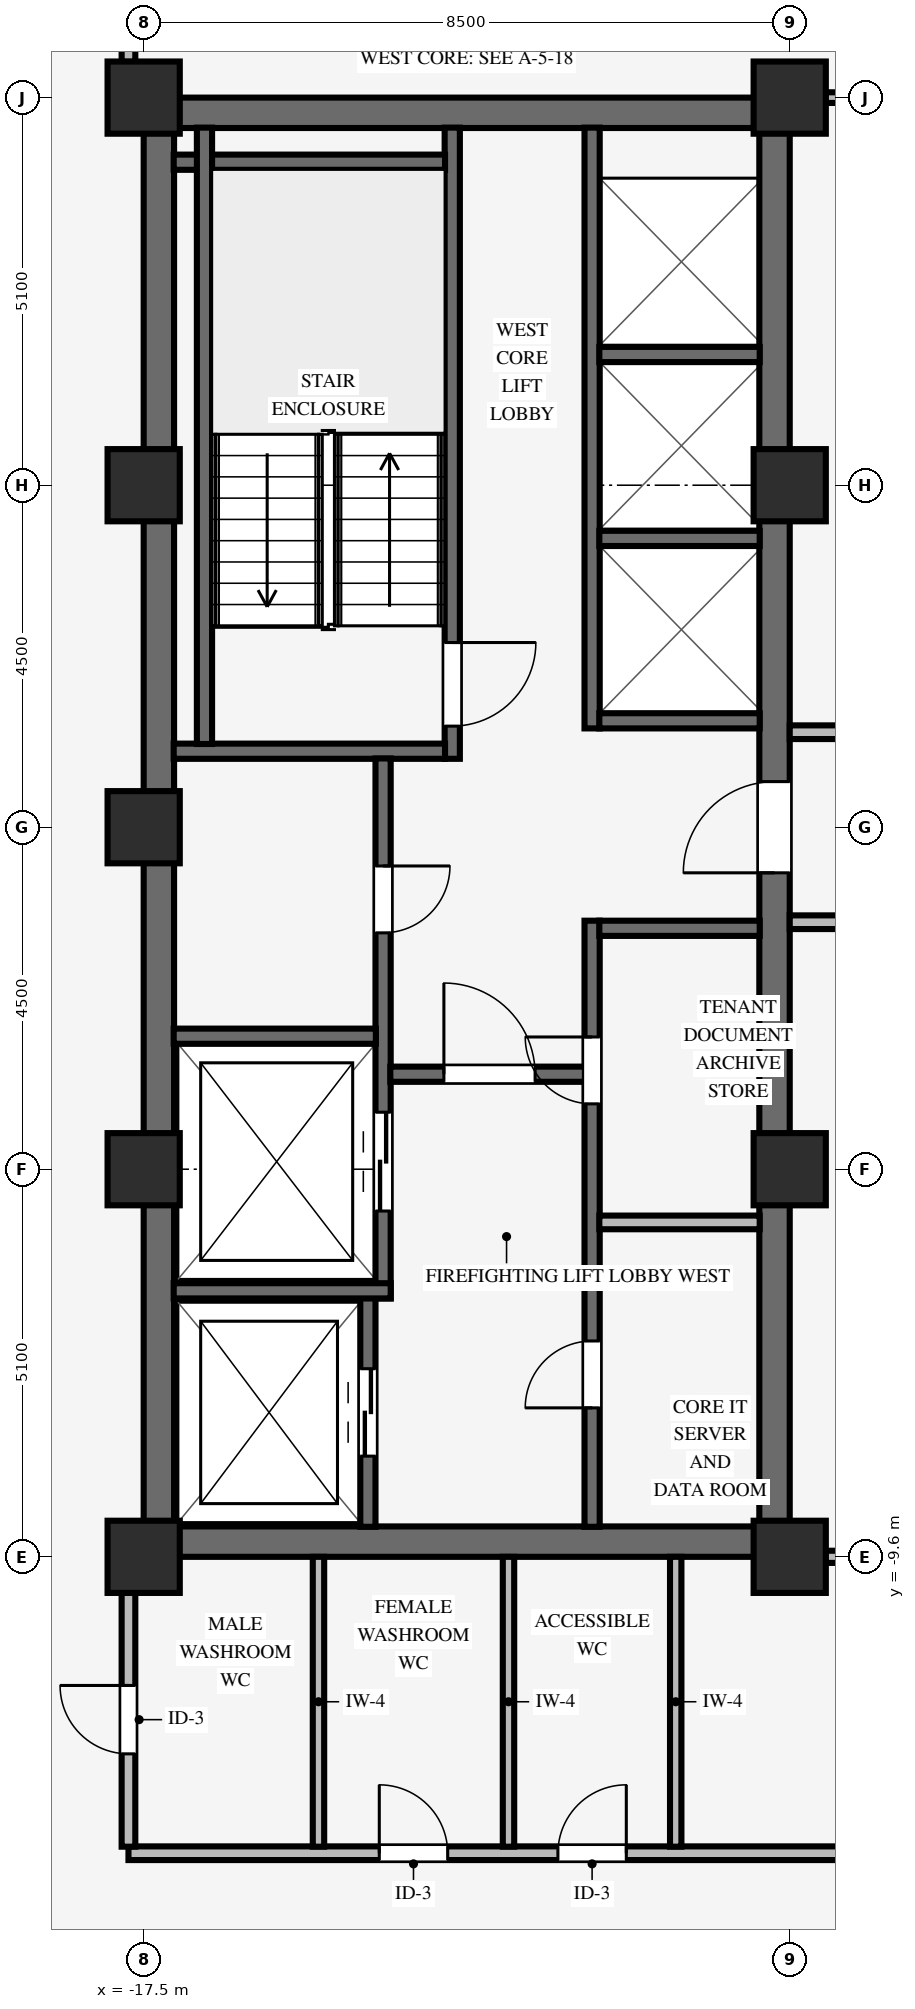
"""IFC4 building model, lengths in metres.
Left out: names, types, materials, properties, quantities, classifications, styles, units other than length and angle.
Written with IfcOpenShell. Run it as: python <this file> out.ifc"""

import sys

from ifc_helpers import new_model, si_unit, direction, frame, frame_2d, origin, origin_2d, place, context, subcontext, project, spatial, rectangle, extrude, source, transform, mapped, element, fill, save


model = new_model("IFC4")
c1 = context("Model", 3, precision=1e-05, world=origin(), true_north=direction((0.0, 1.0)))
c2 = subcontext(c1, "Body", "Model", "MODEL_VIEW")
j1 = project(units=[si_unit("LENGTHUNIT", "METRE"), si_unit("PLANEANGLEUNIT", "RADIAN")], contexts=[c1])
p1 = place(None, origin())
s1 = spatial("IfcSite", under=j1, at=p1, CompositionType="ELEMENT")
p2 = place(p1, origin())
s2 = spatial("IfcBuilding", under=s1, at=p2, CompositionType="ELEMENT")
p3 = place(p2, frame((0.0, 0.0, 134.8)))
s3 = spatial("IfcBuildingStorey", under=s2, at=p3, CompositionType="ELEMENT", Elevation=134.8)
for number, where, z_axis, x_axis in (
    (1, (-17.5, -9.4, 0.0), (0.0, 0.0, 1.0), (1.0, 0.0, 0.0)),
    (2, (-17.5, 9.4, 0.0), (0.0, 0.0, 1.0), (1.0, 0.0, 0.0)),
):
    element("IfcWall", number, at=place(p3, frame(where, z_axis=z_axis, x_axis=x_axis)), inside=s3, PredefinedType="SHEAR", context=c2, shape_type="SweptSolid", body=[
        extrude(rectangle(XDim=8.5, YDim=0.4, at=frame_2d((4.25, 0.0))), origin(), (0.0, 0.0, 1.0), 3.37),
    ])
p4 = place(p3, frame((-17.3, -9.205, 0.0), z_axis=(0.0, 0.0, 1.0), x_axis=(0.0, 1.0, 0.0)))
e3 = element("IfcWall", 3, at=p4, inside=s3, PredefinedType="SHEAR", context=c2, shape_type="SweptSolid", body=[
    extrude(rectangle(XDim=18.41, YDim=0.4, at=frame_2d((9.205, 0.0))), origin(), (0.0, 0.0, 1.0), 3.37),
])
p5 = place(p3, frame((-9.2, -9.205, 0.0), z_axis=(0.0, 0.0, 1.0), x_axis=(0.0, 1.0, 0.0)))
e4 = element("IfcWall", 4, at=p5, inside=s3, PredefinedType="SHEAR", context=c2, shape_type="SweptSolid", body=[
    extrude(rectangle(XDim=18.41, YDim=0.4, at=frame_2d((9.205, 0.0))), origin(), (0.0, 0.0, 1.0), 3.37),
])
p6 = place(p5, frame((8.605, 0.0, 0.0)))
e5 = element("IfcOpeningElement", 5, at=p6, cuts=e4, PredefinedType="OPENING", context=c2, shape_type="SweptSolid", body=[
    extrude(rectangle(XDim=1.2, YDim=2.15, at=frame_2d((0.6, 1.075))), frame((0.0, 0.21, 0.0), z_axis=(0.0, -1.0, 0.0), x_axis=(1.0, 0.0, 0.0)), (0.0, 0.0, 1.0), 0.42),
])
for number, where, z_axis, x_axis in (
    (6, (-17.5, -9.6, 0.0), (0.0, 0.0, 1.0), (1.0, 0.0, 0.0)),
    (7, (-17.5, -4.5, 0.0), (0.0, 0.0, 1.0), (1.0, 0.0, 0.0)),
    (8, (-17.5, 4.5, 0.0), (0.0, 0.0, 1.0), (1.0, 0.0, 0.0)),
    (9, (-17.5, 9.6, 0.0), (0.0, 0.0, 1.0), (1.0, 0.0, 0.0)),
    (10, (-9.0, -9.6, 0.0), (0.0, 0.0, 1.0), (1.0, 0.0, 0.0)),
    (11, (-9.0, -4.5, 0.0), (0.0, 0.0, 1.0), (1.0, 0.0, 0.0)),
    (12, (-9.0, 4.5, 0.0), (0.0, 0.0, 1.0), (1.0, 0.0, 0.0)),
    (13, (-9.0, 9.6, 0.0), (0.0, 0.0, 1.0), (1.0, 0.0, 0.0)),
    (14, (-17.5, 0.0, 0.0), (0.0, 0.0, 1.0), (1.0, 0.0, 0.0)),
):
    element("IfcColumn", number, at=place(p3, frame(where, z_axis=z_axis, x_axis=x_axis)), inside=s3, PredefinedType="COLUMN", context=c2, shape_type="SweptSolid", body=[
        extrude(rectangle(XDim=0.95, YDim=0.95, at=origin_2d()), origin(), (0.0, 0.0, 1.0), 3.37),
    ])
p7 = place(p3, frame((-13.44, 0.9, 0.0), z_axis=(0.0, 0.0, 1.0), x_axis=(0.0, 1.0, 0.0)))
e15 = element("IfcWall", 15, at=p7, inside=s3, PredefinedType="SHEAR", context=c2, shape_type="SweptSolid", body=[
    extrude(rectangle(XDim=8.305, YDim=0.2, at=frame_2d((4.153, 0.0))), origin(), (0.0, 0.0, 1.0), 3.37),
])
p8 = place(p7, frame((1.53, 0.0, 0.0), z_axis=(0.0, 0.0, 1.0), x_axis=(-1.0, 0.0, 0.0)))
e16 = element("IfcOpeningElement", 16, at=p8, cuts=e15, PredefinedType="OPENING", context=c2, shape_type="SweptSolid", body=[
    extrude(rectangle(XDim=1.1, YDim=2.15, at=frame_2d((0.55, 1.075))), frame((0.0, 0.11, 0.0), z_axis=(0.0, -1.0, 0.0), x_axis=(1.0, 0.0, 0.0)), (0.0, 0.0, 1.0), 0.22),
])
for number, where, z_axis, x_axis in (
    (17, (-17.105, 1.0, 0.0), (0.0, 0.0, 1.0), (1.0, 0.0, 0.0)),
    (18, (-17.105, 8.75, 0.0), (0.0, 0.0, 1.0), (1.0, 0.0, 0.0)),
):
    element("IfcWall", number, at=place(p3, frame(where, z_axis=z_axis, x_axis=x_axis)), inside=s3, PredefinedType="SHEAR", context=c2, shape_type="SweptSolid", body=[
        extrude(rectangle(XDim=3.57, YDim=0.2, at=frame_2d((1.785, 0.0))), origin(), (0.0, 0.0, 1.0), 3.37),
    ])
p9 = place(p3, frame((-16.7, 1.095, 0.0), z_axis=(0.0, 0.0, 1.0), x_axis=(0.0, 1.0, 0.0)))
e19 = element("IfcWall", 19, at=p9, inside=s3, PredefinedType="SHEAR", context=c2, shape_type="SweptSolid", body=[
    extrude(rectangle(XDim=8.11, YDim=0.2, at=frame_2d((4.055, 0.0))), origin(), (0.0, 0.0, 1.0), 3.37),
])
p10 = place(p3, frame((-14.55, -9.205, 0.0), z_axis=(0.0, 0.0, 1.0), x_axis=(0.0, 1.0, 0.0)))
e20 = element("IfcWall", 20, at=p10, inside=s3, PredefinedType="SHEAR", context=c2, shape_type="SweptSolid", body=[
    extrude(rectangle(XDim=3.01, YDim=0.2, at=frame_2d((1.505, 0.0))), origin(), (0.0, 0.0, 1.0), 3.37),
])
p11 = place(p10, frame((0.93, 0.0, 0.0)))
e21 = element("IfcOpeningElement", 21, at=p11, cuts=e20, PredefinedType="OPENING", context=c2, shape_type="SweptSolid", body=[
    extrude(rectangle(XDim=1.15, YDim=2.15, at=frame_2d((0.575, 1.075))), frame((0.0, 0.11, 0.0), z_axis=(0.0, -1.0, 0.0), x_axis=(1.0, 0.0, 0.0)), (0.0, 0.0, 1.0), 0.22),
])
p12 = place(p3, frame((-14.35, -6.2, 0.0), z_axis=(0.0, 0.0, 1.0), x_axis=(0.0, 1.0, 0.0)))
e22 = element("IfcWall", 22, at=p12, inside=s3, PredefinedType="SHEAR", context=c2, shape_type="SweptSolid", body=[
    extrude(rectangle(XDim=7.105, YDim=0.2, at=frame_2d((3.552, 0.0))), origin(), (0.0, 0.0, 1.0), 3.37),
])
p13 = place(p12, frame((5.69, 0.0, 0.0), z_axis=(0.0, 0.0, 1.0), x_axis=(-1.0, 0.0, 0.0)))
e23 = element("IfcOpeningElement", 23, at=p13, cuts=e22, PredefinedType="OPENING", context=c2, shape_type="SweptSolid", body=[
    extrude(rectangle(XDim=0.88, YDim=2.1, at=frame_2d((0.44, 1.05))), frame((0.0, 0.11, 0.0), z_axis=(0.0, -1.0, 0.0), x_axis=(1.0, 0.0, 0.0)), (0.0, 0.0, 1.0), 0.22),
])
p14 = place(p12, frame((1.15, 0.0, 0.0)))
e24 = element("IfcOpeningElement", 24, at=p14, cuts=e22, PredefinedType="OPENING", context=c2, shape_type="SweptSolid", body=[
    extrude(rectangle(XDim=1.3, YDim=2.2, at=frame_2d((0.65, 1.1))), frame((0.0, 0.11, 0.0), z_axis=(0.0, -1.0, 0.0), x_axis=(1.0, 0.0, 0.0)), (0.0, 0.0, 1.0), 0.22),
])
p15 = place(p3, frame((-17.105, -6.1, 0.0), z_axis=(0.0, 0.0, 1.0), x_axis=(1.0, 0.0, 0.0)))
e25 = element("IfcWall", 25, at=p15, inside=s3, PredefinedType="SHEAR", context=c2, shape_type="SweptSolid", body=[
    extrude(rectangle(XDim=2.855, YDim=0.2, at=frame_2d((1.427, 0.0))), origin(), (0.0, 0.0, 1.0), 3.37),
])
p16 = place(p3, frame((-17.105, -2.75, 0.0), z_axis=(0.0, 0.0, 1.0), x_axis=(1.0, 0.0, 0.0)))
e26 = element("IfcWall", 26, at=p16, inside=s3, PredefinedType="SHEAR", context=c2, shape_type="SweptSolid", body=[
    extrude(rectangle(XDim=2.66, YDim=0.2, at=frame_2d((1.33, 0.0))), origin(), (0.0, 0.0, 1.0), 3.37),
])
p17 = place(p3, frame((-11.6, -9.205, 0.0), z_axis=(0.0, 0.0, 1.0), x_axis=(0.0, 1.0, 0.0)))
e27 = element("IfcWall", 27, at=p17, inside=s3, PredefinedType="SHEAR", context=c2, shape_type="SweptSolid", body=[
    extrude(rectangle(XDim=7.975, YDim=0.2, at=frame_2d((3.988, 0.0))), origin(), (0.0, 0.0, 1.0), 3.37),
])
p18 = place(p17, frame((1.565, 0.0, 0.0)))
e28 = element("IfcOpeningElement", 28, at=p18, cuts=e27, PredefinedType="OPENING", context=c2, shape_type="SweptSolid", body=[
    extrude(rectangle(XDim=0.88, YDim=2.1, at=frame_2d((0.44, 1.05))), frame((0.0, 0.11, 0.0), z_axis=(0.0, -1.0, 0.0), x_axis=(1.0, 0.0, 0.0)), (0.0, 0.0, 1.0), 0.22),
])
p19 = place(p17, frame((5.565, 0.0, 0.0)))
e29 = element("IfcOpeningElement", 29, at=p19, cuts=e27, PredefinedType="OPENING", context=c2, shape_type="SweptSolid", body=[
    extrude(rectangle(XDim=0.88, YDim=2.1, at=frame_2d((0.44, 1.05))), frame((0.0, 0.11, 0.0), z_axis=(0.0, -1.0, 0.0), x_axis=(1.0, 0.0, 0.0)), (0.0, 0.0, 1.0), 0.22),
])
p20 = place(p3, frame((-14.255, -3.25, 0.0), z_axis=(0.0, 0.0, 1.0), x_axis=(1.0, 0.0, 0.0)))
e30 = element("IfcWall", 30, at=p20, inside=s3, PredefinedType="SHEAR", context=c2, shape_type="SweptSolid", body=[
    extrude(rectangle(XDim=2.56, YDim=0.2, at=frame_2d((1.28, 0.0))), origin(), (0.0, 0.0, 1.0), 3.37),
])
p21 = place(p20, frame((0.705, 0.0, 0.0)))
e31 = element("IfcOpeningElement", 31, at=p21, cuts=e30, PredefinedType="OPENING", context=c2, shape_type="SweptSolid", body=[
    extrude(rectangle(XDim=1.2, YDim=2.15, at=frame_2d((0.6, 1.075))), frame((0.0, 0.11, 0.0), z_axis=(0.0, -1.0, 0.0), x_axis=(1.0, 0.0, 0.0)), (0.0, 0.0, 1.0), 0.22),
])
p22 = place(p3, frame((-11.505, -1.33, 0.0), z_axis=(0.0, 0.0, 1.0), x_axis=(1.0, 0.0, 0.0)))
e32 = element("IfcWall", 32, at=p22, inside=s3, PredefinedType="SHEAR", context=c2, shape_type="SweptSolid", body=[
    extrude(rectangle(XDim=2.11, YDim=0.2, at=frame_2d((1.055, 0.0))), origin(), (0.0, 0.0, 1.0), 3.37),
])
p23 = place(p3, frame((-11.505, -5.2, 0.0), z_axis=(0.0, 0.0, 1.0), x_axis=(1.0, 0.0, 0.0)))
e33 = element("IfcWall", 33, at=p23, inside=s3, PredefinedType="PARTITIONING", context=c2, shape_type="SweptSolid", body=[
    extrude(rectangle(XDim=2.11, YDim=0.18, at=frame_2d((1.055, 0.0))), origin(), (0.0, 0.0, 1.0), 3.36),
])
p24 = place(p3, frame((-11.6, 1.3, 0.0), z_axis=(0.0, 0.0, 1.0), x_axis=(0.0, 1.0, 0.0)))
e34 = element("IfcWall", 34, at=p24, inside=s3, PredefinedType="SHEAR", context=c2, shape_type="SweptSolid", body=[
    extrude(rectangle(XDim=7.905, YDim=0.2, at=frame_2d((3.953, 0.0))), origin(), (0.0, 0.0, 1.0), 3.37),
])
for number, where, z_axis, x_axis in (
    (35, (-11.505, 1.4, 0.0), (0.0, 0.0, 1.0), (1.0, 0.0, 0.0)),
    (36, (-11.505, 3.8, 0.0), (0.0, 0.0, 1.0), (1.0, 0.0, 0.0)),
    (37, (-11.505, 6.22, 0.0), (0.0, 0.0, 1.0), (1.0, 0.0, 0.0)),
):
    element("IfcWall", number, at=place(p3, frame(where, z_axis=z_axis, x_axis=x_axis)), inside=s3, PredefinedType="SHEAR", context=c2, shape_type="SweptSolid", body=[
        extrude(rectangle(XDim=2.11, YDim=0.2, at=frame_2d((1.055, 0.0))), origin(), (0.0, 0.0, 1.0), 3.37),
    ])
p25 = place(p3, frame((-17.7, -13.5, 0.0), z_axis=(0.0, 0.0, 1.0), x_axis=(1.0, 0.0, 0.0)))
e38 = element("IfcWall", 38, at=p25, inside=s3, PredefinedType="PARTITIONING", context=c2, shape_type="SweptSolid", body=[
    extrude(rectangle(XDim=24.3, YDim=0.18, at=frame_2d((12.15, 0.0))), origin(), (0.0, 0.0, 1.0), 2.998),
])
p26 = place(p25, frame((19.47, 0.0, 0.0)))
e39 = element("IfcOpeningElement", 39, at=p26, cuts=e38, PredefinedType="OPENING", context=c2, shape_type="SweptSolid", body=[
    extrude(rectangle(XDim=0.96, YDim=2.1, at=frame_2d((0.48, 1.05))), frame((0.0, 0.1, 0.0), z_axis=(0.0, -1.0, 0.0), x_axis=(1.0, 0.0, 0.0)), (0.0, 0.0, 1.0), 0.2),
])
p27 = place(p25, frame((10.92, 0.0, 0.0)))
e40 = element("IfcOpeningElement", 40, at=p27, cuts=e38, PredefinedType="OPENING", context=c2, shape_type="SweptSolid", body=[
    extrude(rectangle(XDim=0.96, YDim=2.1, at=frame_2d((0.48, 1.05))), frame((0.0, 0.1, 0.0), z_axis=(0.0, -1.0, 0.0), x_axis=(1.0, 0.0, 0.0)), (0.0, 0.0, 1.0), 0.2),
])
p28 = place(p25, frame((3.3, 0.0, 0.0)))
e41 = element("IfcOpeningElement", 41, at=p28, cuts=e38, PredefinedType="OPENING", context=c2, shape_type="SweptSolid", body=[
    extrude(rectangle(XDim=0.9, YDim=2.1, at=frame_2d((0.45, 1.05))), frame((0.0, 0.1, 0.0), z_axis=(0.0, -1.0, 0.0), x_axis=(1.0, 0.0, 0.0)), (0.0, 0.0, 1.0), 0.2),
])
p29 = place(p25, frame((5.65, 0.0, 0.0)))
e42 = element("IfcOpeningElement", 42, at=p29, cuts=e38, PredefinedType="OPENING", context=c2, shape_type="SweptSolid", body=[
    extrude(rectangle(XDim=0.9, YDim=2.1, at=frame_2d((0.45, 1.05))), frame((0.0, 0.1, 0.0), z_axis=(0.0, -1.0, 0.0), x_axis=(1.0, 0.0, 0.0)), (0.0, 0.0, 1.0), 0.2),
])
p30 = place(p3, frame((-8.529, -9.6, 0.0), z_axis=(0.0, 0.0, 1.0), x_axis=(1.0, 0.0, 0.0)))
e43 = element("IfcWall", 43, at=p30, inside=s3, PredefinedType="PARTITIONING", context=c2, shape_type="SweptSolid", body=[
    extrude(rectangle(XDim=8.353, YDim=0.16, at=frame_2d((4.177, 0.0))), origin(), (0.0, 0.0, 1.0), 2.405),
])
p31 = place(p3, frame((-9.0, -1.25, 0.0), z_axis=(0.0, 0.0, 1.0), x_axis=(1.0, 0.0, 0.0)))
e44 = element("IfcWall", 44, at=p31, inside=s3, PredefinedType="PARTITIONING", context=c2, shape_type="SweptSolid", body=[
    extrude(rectangle(XDim=15.6, YDim=0.18, at=frame_2d((7.8, 0.0))), origin(), (0.0, 0.0, 1.0), 3.36),
])
p32 = place(p31, frame((7.32, 0.0, 0.0)))
e45 = element("IfcOpeningElement", 45, at=p32, cuts=e44, PredefinedType="OPENING", context=c2, shape_type="SweptSolid", body=[
    extrude(rectangle(XDim=0.96, YDim=2.1, at=frame_2d((0.48, 1.05))), frame((0.0, 0.1, 0.0), z_axis=(0.0, -1.0, 0.0), x_axis=(1.0, 0.0, 0.0)), (0.0, 0.0, 1.0), 0.2),
])
p33 = place(p3, frame((-9.0, 1.25, 0.0), z_axis=(0.0, 0.0, 1.0), x_axis=(1.0, 0.0, 0.0)))
e46 = element("IfcWall", 46, at=p33, inside=s3, PredefinedType="PARTITIONING", context=c2, shape_type="SweptSolid", body=[
    extrude(rectangle(XDim=15.6, YDim=0.18, at=frame_2d((7.8, 0.0))), origin(), (0.0, 0.0, 1.0), 3.36),
])
p34 = place(p33, frame((3.32, 0.0, 0.0)))
e47 = element("IfcOpeningElement", 47, at=p34, cuts=e46, PredefinedType="OPENING", context=c2, shape_type="SweptSolid", body=[
    extrude(rectangle(XDim=0.96, YDim=2.1, at=frame_2d((0.48, 1.05))), frame((0.0, 0.1, 0.0), z_axis=(0.0, -1.0, 0.0), x_axis=(1.0, 0.0, 0.0)), (0.0, 0.0, 1.0), 0.2),
])
p35 = place(p3, frame((-8.529, 9.6, 0.0), z_axis=(0.0, 0.0, 1.0), x_axis=(1.0, 0.0, 0.0)))
e48 = element("IfcWall", 48, at=p35, inside=s3, PredefinedType="PARTITIONING", context=c2, shape_type="SweptSolid", body=[
    extrude(rectangle(XDim=8.353, YDim=0.14, at=frame_2d((4.177, 0.0))), origin(), (0.0, 0.0, 1.0), 2.405),
])
p36 = place(p3, frame((-17.7, -13.414, 0.0), z_axis=(0.0, 0.0, 1.0), x_axis=(0.0, 1.0, 0.0)))
e49 = element("IfcWall", 49, at=p36, inside=s3, PredefinedType="PARTITIONING", context=c2, shape_type="SweptSolid", body=[
    extrude(rectangle(XDim=3.343, YDim=0.18, at=frame_2d((1.671, 0.0))), origin(), (0.0, 0.0, 1.0), 2.816),
])
p37 = place(p36, frame((1.221, 0.0, 0.0)))
e50 = element("IfcOpeningElement", 50, at=p37, cuts=e49, PredefinedType="OPENING", context=c2, shape_type="SweptSolid", body=[
    extrude(rectangle(XDim=0.9, YDim=2.1, at=frame_2d((0.45, 1.05))), frame((0.0, 0.1, 0.0), z_axis=(0.0, -1.0, 0.0), x_axis=(1.0, 0.0, 0.0)), (0.0, 0.0, 1.0), 0.2),
])
p38 = place(p3, frame((-17.7, 10.071, 0.0), z_axis=(0.0, 0.0, 1.0), x_axis=(0.0, 1.0, 0.0)))
e51 = element("IfcWall", 51, at=p38, inside=s3, PredefinedType="PARTITIONING", context=c2, shape_type="SweptSolid", body=[
    extrude(rectangle(XDim=3.343, YDim=0.18, at=frame_2d((1.671, 0.0))), origin(), (0.0, 0.0, 1.0), 2.816),
])
for number, where, z_axis, x_axis in (
    (52, (-15.2, -13.414, 0.0), (0.0, 0.0, 1.0), (0.0, 1.0, 0.0)),
    (53, (-12.7, -13.414, 0.0), (0.0, 0.0, 1.0), (0.0, 1.0, 0.0)),
    (54, (-10.5, -13.414, 0.0), (0.0, 0.0, 1.0), (0.0, 1.0, 0.0)),
):
    element("IfcWall", number, at=place(p3, frame(where, z_axis=z_axis, x_axis=x_axis)), inside=s3, PredefinedType="PARTITIONING", context=c2, shape_type="SweptSolid", body=[
        extrude(rectangle(XDim=3.814, YDim=0.15, at=frame_2d((1.907, 0.0))), origin(), (0.0, 0.0, 1.0), 3.36),
    ])
m1 = source(origin(), c2, "Body", "SweptSolid", [
    extrude(rectangle(XDim=1.1, YDim=2.15, at=frame_2d((0.55, 1.075))), frame((0.0, 0.025, 0.0), z_axis=(0.0, -1.0, 0.0), x_axis=(1.0, 0.0, 0.0)), (0.0, 0.0, 1.0), 0.05),
])
p39 = place(p8, origin())
e55 = element("IfcDoor", 55, at=p39, inside=s3, OperationType="SINGLE_SWING_LEFT", PredefinedType="DOOR", context=c2, shape_type="MappedRepresentation", body=[
    mapped(m1, transform((0.0, 0.0, 0.0), scale=1.0)),
])
fill(e16, e55)
m2 = source(origin(), c2, "Body", "SweptSolid", [
    extrude(rectangle(XDim=0.88, YDim=2.1, at=frame_2d((0.44, 1.05))), frame((0.0, 0.025, 0.0), z_axis=(0.0, -1.0, 0.0), x_axis=(1.0, 0.0, 0.0)), (0.0, 0.0, 1.0), 0.05),
])
p40 = place(p13, origin())
e56 = element("IfcDoor", 56, at=p40, inside=s3, OperationType="SINGLE_SWING_LEFT", PredefinedType="DOOR", context=c2, shape_type="MappedRepresentation", body=[
    mapped(m2, transform((0.0, 0.0, 0.0), scale=1.0)),
])
fill(e23, e56)
m3 = source(origin(), c2, "Body", "SweptSolid", [
    extrude(rectangle(XDim=1.2, YDim=2.15, at=frame_2d((0.6, 1.075))), frame((0.0, 0.025, 0.0), z_axis=(0.0, -1.0, 0.0), x_axis=(1.0, 0.0, 0.0)), (0.0, 0.0, 1.0), 0.05),
])
p41 = place(p21, origin())
e57 = element("IfcDoor", 57, at=p41, inside=s3, OperationType="SINGLE_SWING_LEFT", PredefinedType="DOOR", context=c2, shape_type="MappedRepresentation", body=[
    mapped(m3, transform((0.0, 0.0, 0.0), scale=1.0)),
])
fill(e31, e57)
p42 = place(p18, origin())
e58 = element("IfcDoor", 58, at=p42, inside=s3, OperationType="SINGLE_SWING_LEFT", PredefinedType="DOOR", context=c2, shape_type="MappedRepresentation", body=[
    mapped(m2, transform((0.0, 0.0, 0.0), scale=1.0)),
])
fill(e28, e58)
p43 = place(p19, origin())
e59 = element("IfcDoor", 59, at=p43, inside=s3, OperationType="SINGLE_SWING_RIGHT", PredefinedType="DOOR", context=c2, shape_type="MappedRepresentation", body=[
    mapped(m2, transform((0.0, 0.0, 0.0), scale=1.0)),
])
fill(e29, e59)
p44 = place(p6, origin())
e60 = element("IfcDoor", 60, at=p44, inside=s3, OperationType="SINGLE_SWING_LEFT", PredefinedType="DOOR", context=c2, shape_type="MappedRepresentation", body=[
    mapped(m3, transform((0.0, 0.0, 0.0), scale=1.0)),
])
fill(e5, e60)
m4 = source(origin(), c2, "Body", "SweptSolid", [
    extrude(rectangle(XDim=1.15, YDim=2.15, at=frame_2d((0.575, 1.075))), frame((0.0, 0.025, 0.0), z_axis=(0.0, -1.0, 0.0), x_axis=(1.0, 0.0, 0.0)), (0.0, 0.0, 1.0), 0.05),
])
p45 = place(p11, origin())
e61 = element("IfcDoor", 61, at=p45, inside=s3, OperationType="DOUBLE_DOOR_SLIDING", PredefinedType="DOOR", context=c2, shape_type="MappedRepresentation", body=[
    mapped(m4, transform((0.0, 0.0, 0.0), scale=1.0)),
])
fill(e21, e61)
m5 = source(origin(), c2, "Body", "SweptSolid", [
    extrude(rectangle(XDim=1.3, YDim=2.2, at=frame_2d((0.65, 1.1))), frame((0.0, 0.025, 0.0), z_axis=(0.0, -1.0, 0.0), x_axis=(1.0, 0.0, 0.0)), (0.0, 0.0, 1.0), 0.05),
])
p46 = place(p14, origin())
e62 = element("IfcDoor", 62, at=p46, inside=s3, OperationType="DOUBLE_DOOR_SLIDING", PredefinedType="DOOR", context=c2, shape_type="MappedRepresentation", body=[
    mapped(m5, transform((0.0, 0.0, 0.0), scale=1.0)),
])
fill(e24, e62)
m6 = source(origin(), c2, "Body", "SweptSolid", [
    extrude(rectangle(XDim=0.9, YDim=2.1, at=frame_2d((0.45, 1.05))), frame((0.0, 0.025, 0.0), z_axis=(0.0, -1.0, 0.0), x_axis=(1.0, 0.0, 0.0)), (0.0, 0.0, 1.0), 0.05),
])
p47 = place(p37, origin())
e63 = element("IfcDoor", 63, at=p47, inside=s3, OperationType="SINGLE_SWING_RIGHT", PredefinedType="DOOR", context=c2, shape_type="MappedRepresentation", body=[
    mapped(m6, transform((0.0, 0.0, 0.0), scale=1.0)),
])
fill(e50, e63)
p48 = place(p28, origin())
e64 = element("IfcDoor", 64, at=p48, inside=s3, OperationType="SINGLE_SWING_LEFT", PredefinedType="DOOR", context=c2, shape_type="MappedRepresentation", body=[
    mapped(m6, transform((0.0, 0.0, 0.0), scale=1.0)),
])
fill(e41, e64)
p49 = place(p29, origin())
e65 = element("IfcDoor", 65, at=p49, inside=s3, OperationType="SINGLE_SWING_RIGHT", PredefinedType="DOOR", context=c2, shape_type="MappedRepresentation", body=[
    mapped(m6, transform((0.0, 0.0, 0.0), scale=1.0)),
])
fill(e42, e65)
save(model, sys.argv[1])
